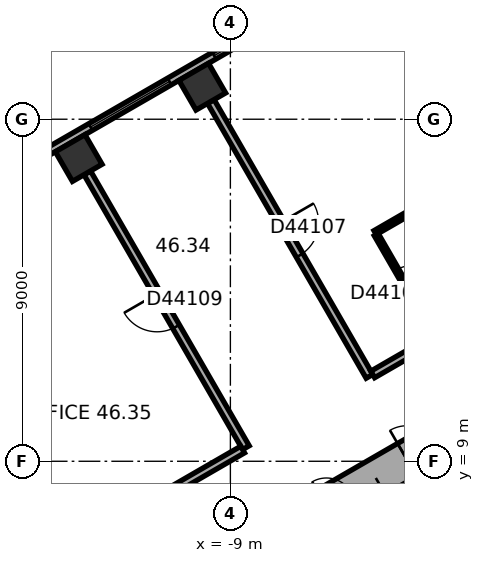
"""IFC4 building model, lengths in metres.
Left out: names, types, materials, properties, quantities, classifications, styles, units other than length and angle.
Written with IfcOpenShell. Run it as: python <this file> out.ifc"""

import sys

from ifc_helpers import new_model, si_unit, direction, frame, frame_2d, origin, origin_2d, place, context, subcontext, project, spatial, rectangle, extrude, element, fill, save


model = new_model("IFC4")
c1 = context("Model", 3, precision=1e-05, world=origin(), true_north=direction((0.0, 1.0)))
c2 = subcontext(c1, "Body", "Model", "MODEL_VIEW")
j1 = project(units=[si_unit("LENGTHUNIT", "METRE"), si_unit("PLANEANGLEUNIT", "RADIAN")], contexts=[c1])
p1 = place(None, origin())
s1 = spatial("IfcSite", under=j1, at=p1, CompositionType="ELEMENT")
p2 = place(p1, origin())
s2 = spatial("IfcBuilding", under=s1, at=p2, CompositionType="ELEMENT")
p3 = place(p2, frame((0.0, 0.0, 187.3)))
s3 = spatial("IfcBuildingStorey", under=s2, at=p3, CompositionType="ELEMENT", Elevation=187.3)
for number, where, z_axis, x_axis in (
    (1, (-9.74, 18.856, 0.0), (0.0, 0.0, 1.0), (-0.866, -0.5, 0.0)),
    (2, (-12.991, 16.979, 0.0), (0.0, 0.0, 1.0), (-0.866, -0.5, 0.0)),
):
    element("IfcColumn", number, at=place(p3, frame(where, z_axis=z_axis, x_axis=x_axis)), inside=s3, PredefinedType="COLUMN", context=c2, shape_type="SweptSolid", body=[
        extrude(rectangle(XDim=0.9, YDim=0.9, at=origin_2d()), origin(), (0.0, 0.0, 1.0), 3.7),
    ])
p4 = place(p3, frame((0.25, 11.691, 0.0), z_axis=(0.0, 0.0, 1.0), x_axis=(-0.866022616891, -0.50000482701, 0.0)))
e3 = element("IfcWall", 3, at=p4, inside=s3, PredefinedType="SHEAR", context=c2, shape_type="SweptSolid", body=[
    extrude(rectangle(XDim=12.125, YDim=1.0, at=frame_2d((6.062, 0.0))), origin(), (0.0, 0.0, 1.0), 3.7),
])
p5 = place(p4, frame((6.262, 0.0, 0.0)))
e4 = element("IfcOpeningElement", 4, at=p5, cuts=e3, PredefinedType="OPENING", context=c2, shape_type="SweptSolid", body=[
    extrude(rectangle(XDim=1.5, YDim=2.1, at=frame_2d((0.75, 1.05))), frame((0.0, 0.51, 0.0), z_axis=(0.0, -1.0, 0.0), x_axis=(1.0, 0.0, 0.0)), (0.0, 0.0, 1.0), 1.02),
])
p6 = place(p4, frame((1.812, 0.0, 0.0)))
e5 = element("IfcOpeningElement", 5, at=p6, cuts=e3, PredefinedType="OPENING", context=c2, shape_type="SweptSolid", body=[
    extrude(rectangle(XDim=0.9, YDim=2.1, at=frame_2d((0.45, 1.05))), frame((0.0, 0.51, 0.0), z_axis=(0.0, -1.0, 0.0), x_axis=(1.0, 0.0, 0.0)), (0.0, 0.0, 1.0), 1.02),
])
p7 = place(p4, frame((4.412, 0.0, 0.0)))
e6 = element("IfcOpeningElement", 6, at=p7, cuts=e3, PredefinedType="OPENING", context=c2, shape_type="SweptSolid", body=[
    extrude(rectangle(XDim=0.9, YDim=2.1, at=frame_2d((0.45, 1.05))), frame((0.0, 0.51, 0.0), z_axis=(0.0, -1.0, 0.0), x_axis=(1.0, 0.0, 0.0)), (0.0, 0.0, 1.0), 1.02),
])
p8 = place(p3, frame((-2.961, 23.405, 0.0), z_axis=(0.0, 0.0, 1.0), x_axis=(-0.866023315909, -0.500003616288, 0.0)))
e7 = element("IfcWall", 7, at=p8, inside=s3, PredefinedType="STANDARD", context=c2, shape_type="SweptSolid", body=[
    extrude(rectangle(XDim=20.044, YDim=0.2, at=frame_2d((10.022, 0.0))), origin(), (0.0, 0.0, 1.0), 3.7),
])
p9 = place(p8, frame((1.314, 0.0, 0.9)))
e8 = element("IfcOpeningElement", 8, at=p9, cuts=e7, PredefinedType="OPENING", context=c2, shape_type="SweptSolid", body=[
    extrude(rectangle(XDim=2.4, YDim=2.0, at=frame_2d((1.2, 1.0))), frame((0.0, 0.11, 0.0), z_axis=(0.0, -1.0, 0.0), x_axis=(1.0, 0.0, 0.0)), (0.0, 0.0, 1.0), 0.22),
])
p10 = place(p8, frame((5.069, 0.0, 0.9)))
e9 = element("IfcOpeningElement", 9, at=p10, cuts=e7, PredefinedType="OPENING", context=c2, shape_type="SweptSolid", body=[
    extrude(rectangle(XDim=2.4, YDim=2.0, at=frame_2d((1.2, 1.0))), frame((0.0, 0.11, 0.0), z_axis=(0.0, -1.0, 0.0), x_axis=(1.0, 0.0, 0.0)), (0.0, 0.0, 1.0), 0.22),
])
p11 = place(p8, frame((8.823, 0.0, 0.9)))
e10 = element("IfcOpeningElement", 10, at=p11, cuts=e7, PredefinedType="OPENING", context=c2, shape_type="SweptSolid", body=[
    extrude(rectangle(XDim=2.4, YDim=2.0, at=frame_2d((1.2, 1.0))), frame((0.0, 0.11, 0.0), z_axis=(0.0, -1.0, 0.0), x_axis=(1.0, 0.0, 0.0)), (0.0, 0.0, 1.0), 0.22),
])
p12 = place(p8, frame((12.577, 0.0, 0.9)))
e11 = element("IfcOpeningElement", 11, at=p12, cuts=e7, PredefinedType="OPENING", context=c2, shape_type="SweptSolid", body=[
    extrude(rectangle(XDim=2.4, YDim=2.0, at=frame_2d((1.2, 1.0))), frame((0.0, 0.11, 0.0), z_axis=(0.0, -1.0, 0.0), x_axis=(1.0, 0.0, 0.0)), (0.0, 0.0, 1.0), 0.22),
])
p13 = place(p8, frame((16.331, 0.0, 0.9)))
e12 = element("IfcOpeningElement", 12, at=p13, cuts=e7, PredefinedType="OPENING", context=c2, shape_type="SweptSolid", body=[
    extrude(rectangle(XDim=2.4, YDim=2.0, at=frame_2d((1.2, 1.0))), frame((0.0, 0.11, 0.0), z_axis=(0.0, -1.0, 0.0), x_axis=(1.0, 0.0, 0.0)), (0.0, 0.0, 1.0), 0.22),
])
p14 = place(p3, frame((-12.766, 16.589, 0.0), z_axis=(0.0, 0.0, 1.0), x_axis=(0.500010139422, -0.866019549707, 0.0)))
e13 = element("IfcWall", 13, at=p14, inside=s3, PredefinedType="PARTITIONING", context=c2, shape_type="SweptSolid", body=[
    extrude(rectangle(XDim=8.35, YDim=0.2, at=frame_2d((4.175, 0.0))), origin(), (0.0, 0.0, 1.0), 3.42),
])
p15 = place(p14, frame((3.675, 0.0, 0.0)))
e14 = element("IfcOpeningElement", 14, at=p15, cuts=e13, PredefinedType="OPENING", context=c2, shape_type="SweptSolid", body=[
    extrude(rectangle(XDim=1.0, YDim=2.1, at=frame_2d((0.5, 1.05))), frame((0.0, 0.11, 0.0), z_axis=(0.0, -1.0, 0.0), x_axis=(1.0, 0.0, 0.0)), (0.0, 0.0, 1.0), 0.22),
])
p16 = place(p3, frame((-9.515, 18.466, 0.0), z_axis=(0.0, 0.0, 1.0), x_axis=(0.500010139422, -0.866019549707, 0.0)))
e15 = element("IfcWall", 15, at=p16, inside=s3, PredefinedType="PARTITIONING", context=c2, shape_type="SweptSolid", body=[
    extrude(rectangle(XDim=8.35, YDim=0.2, at=frame_2d((4.175, 0.0))), origin(), (0.0, 0.0, 1.0), 2.87),
])
p17 = place(p16, frame((3.675, 0.0, 0.0)))
e16 = element("IfcOpeningElement", 16, at=p17, cuts=e15, PredefinedType="OPENING", context=c2, shape_type="SweptSolid", body=[
    extrude(rectangle(XDim=1.0, YDim=2.1, at=frame_2d((0.5, 1.05))), frame((0.0, 0.11, 0.0), z_axis=(0.0, -1.0, 0.0), x_axis=(1.0, 0.0, 0.0)), (0.0, 0.0, 1.0), 0.22),
])
p18 = place(p3, frame((-8.678, 9.308, 0.0), z_axis=(0.0, 0.0, 1.0), x_axis=(-0.866000359435, -0.500043375578, 0.0)))
e17 = element("IfcWall", 17, at=p18, inside=s3, PredefinedType="PARTITIONING", context=c2, shape_type="SweptSolid", body=[
    extrude(rectangle(XDim=3.161, YDim=0.2, at=frame_2d((1.581, 0.0))), origin(), (0.0, 0.0, 1.0), 3.42),
])
p19 = place(p3, frame((-5.191, 15.016, 0.0), z_axis=(0.0, 0.0, 1.0), x_axis=(0.866034573852, 0.49998411664, 0.0)))
e18 = element("IfcWall", 18, at=p19, inside=s3, PredefinedType="PARTITIONING", context=c2, shape_type="SweptSolid", body=[
    extrude(rectangle(XDim=2.8, YDim=0.12, at=frame_2d((1.4, 0.0))), origin(), (0.0, 0.0, 1.0), 3.42),
])
p20 = place(p3, frame((-3.641, 12.331, 0.0), z_axis=(0.0, 0.0, 1.0), x_axis=(-0.499991248344, 0.866030456496, 0.0)))
e19 = element("IfcWall", 19, at=p20, inside=s3, PredefinedType="PARTITIONING", context=c2, shape_type="SweptSolid", body=[
    extrude(rectangle(XDim=3.04, YDim=0.12, at=frame_2d((1.52, 0.0))), origin(), (0.0, 0.0, 1.0), 3.42),
])
p21 = place(p20, frame((1.07, 0.0, 0.0)))
e20 = element("IfcOpeningElement", 20, at=p21, cuts=e19, PredefinedType="OPENING", context=c2, shape_type="SweptSolid", body=[
    extrude(rectangle(XDim=0.9, YDim=2.1, at=frame_2d((0.45, 1.05))), frame((0.0, 0.07, 0.0), z_axis=(0.0, -1.0, 0.0), x_axis=(1.0, 0.0, 0.0)), (0.0, 0.0, 1.0), 0.14),
])
p22 = place(p3, frame((-1.167, 13.645, 0.0), z_axis=(0.0, 0.0, 1.0), x_axis=(-0.866034830959, -0.499983671299, 0.0)))
e21 = element("IfcWall", 21, at=p22, inside=s3, PredefinedType="PARTITIONING", context=c2, shape_type="SweptSolid", body=[
    extrude(rectangle(XDim=4.719, YDim=0.2, at=frame_2d((2.36, 0.0))), origin(), (0.0, 0.0, 1.0), 3.42),
])
p23 = place(p10, origin())
e22 = element("IfcWindow", 22, at=p23, inside=s3, PartitioningType="SINGLE_PANEL", PredefinedType="WINDOW", context=c2, shape_type="SweptSolid", body=[
    extrude(rectangle(XDim=2.4, YDim=2.0, at=frame_2d((1.2, 1.0))), frame((0.0, 0.03, 0.0), z_axis=(0.0, -1.0, 0.0), x_axis=(1.0, 0.0, 0.0)), (0.0, 0.0, 1.0), 0.06),
])
fill(e9, e22)
p24 = place(p11, origin())
e23 = element("IfcWindow", 23, at=p24, inside=s3, PartitioningType="SINGLE_PANEL", PredefinedType="WINDOW", context=c2, shape_type="SweptSolid", body=[
    extrude(rectangle(XDim=2.4, YDim=2.0, at=frame_2d((1.2, 1.0))), frame((0.0, 0.03, 0.0), z_axis=(0.0, -1.0, 0.0), x_axis=(1.0, 0.0, 0.0)), (0.0, 0.0, 1.0), 0.06),
])
fill(e10, e23)
p25 = place(p5, origin())
e24 = element("IfcDoor", 24, at=p25, inside=s3, OperationType="DOUBLE_DOOR_SINGLE_SWING", PredefinedType="DOOR", context=c2, shape_type="SweptSolid", body=[
    extrude(rectangle(XDim=1.5, YDim=2.1, at=frame_2d((0.75, 1.05))), frame((0.0, 0.025, 0.0), z_axis=(0.0, -1.0, 0.0), x_axis=(1.0, 0.0, 0.0)), (0.0, 0.0, 1.0), 0.05),
])
fill(e4, e24)
p26 = place(p17, origin())
e25 = element("IfcDoor", 25, at=p26, inside=s3, OperationType="SINGLE_SWING_LEFT", PredefinedType="DOOR", context=c2, shape_type="SweptSolid", body=[
    extrude(rectangle(XDim=1.0, YDim=2.1, at=frame_2d((0.5, 1.05))), frame((0.0, 0.025, 0.0), z_axis=(0.0, -1.0, 0.0), x_axis=(1.0, 0.0, 0.0)), (0.0, 0.0, 1.0), 0.05),
])
fill(e16, e25)
p27 = place(p21, origin())
e26 = element("IfcDoor", 26, at=p27, inside=s3, OperationType="SINGLE_SWING_LEFT", PredefinedType="DOOR", context=c2, shape_type="SweptSolid", body=[
    extrude(rectangle(XDim=0.9, YDim=2.1, at=frame_2d((0.45, 1.05))), frame((0.0, 0.025, 0.0), z_axis=(0.0, -1.0, 0.0), x_axis=(1.0, 0.0, 0.0)), (0.0, 0.0, 1.0), 0.05),
])
fill(e20, e26)
p28 = place(p15, origin())
e27 = element("IfcDoor", 27, at=p28, inside=s3, OperationType="SINGLE_SWING_LEFT", PredefinedType="DOOR", context=c2, shape_type="SweptSolid", body=[
    extrude(rectangle(XDim=1.0, YDim=2.1, at=frame_2d((0.5, 1.05))), frame((0.0, 0.025, 0.0), z_axis=(0.0, -1.0, 0.0), x_axis=(1.0, 0.0, 0.0)), (0.0, 0.0, 1.0), 0.05),
])
fill(e14, e27)
save(model, sys.argv[1])
